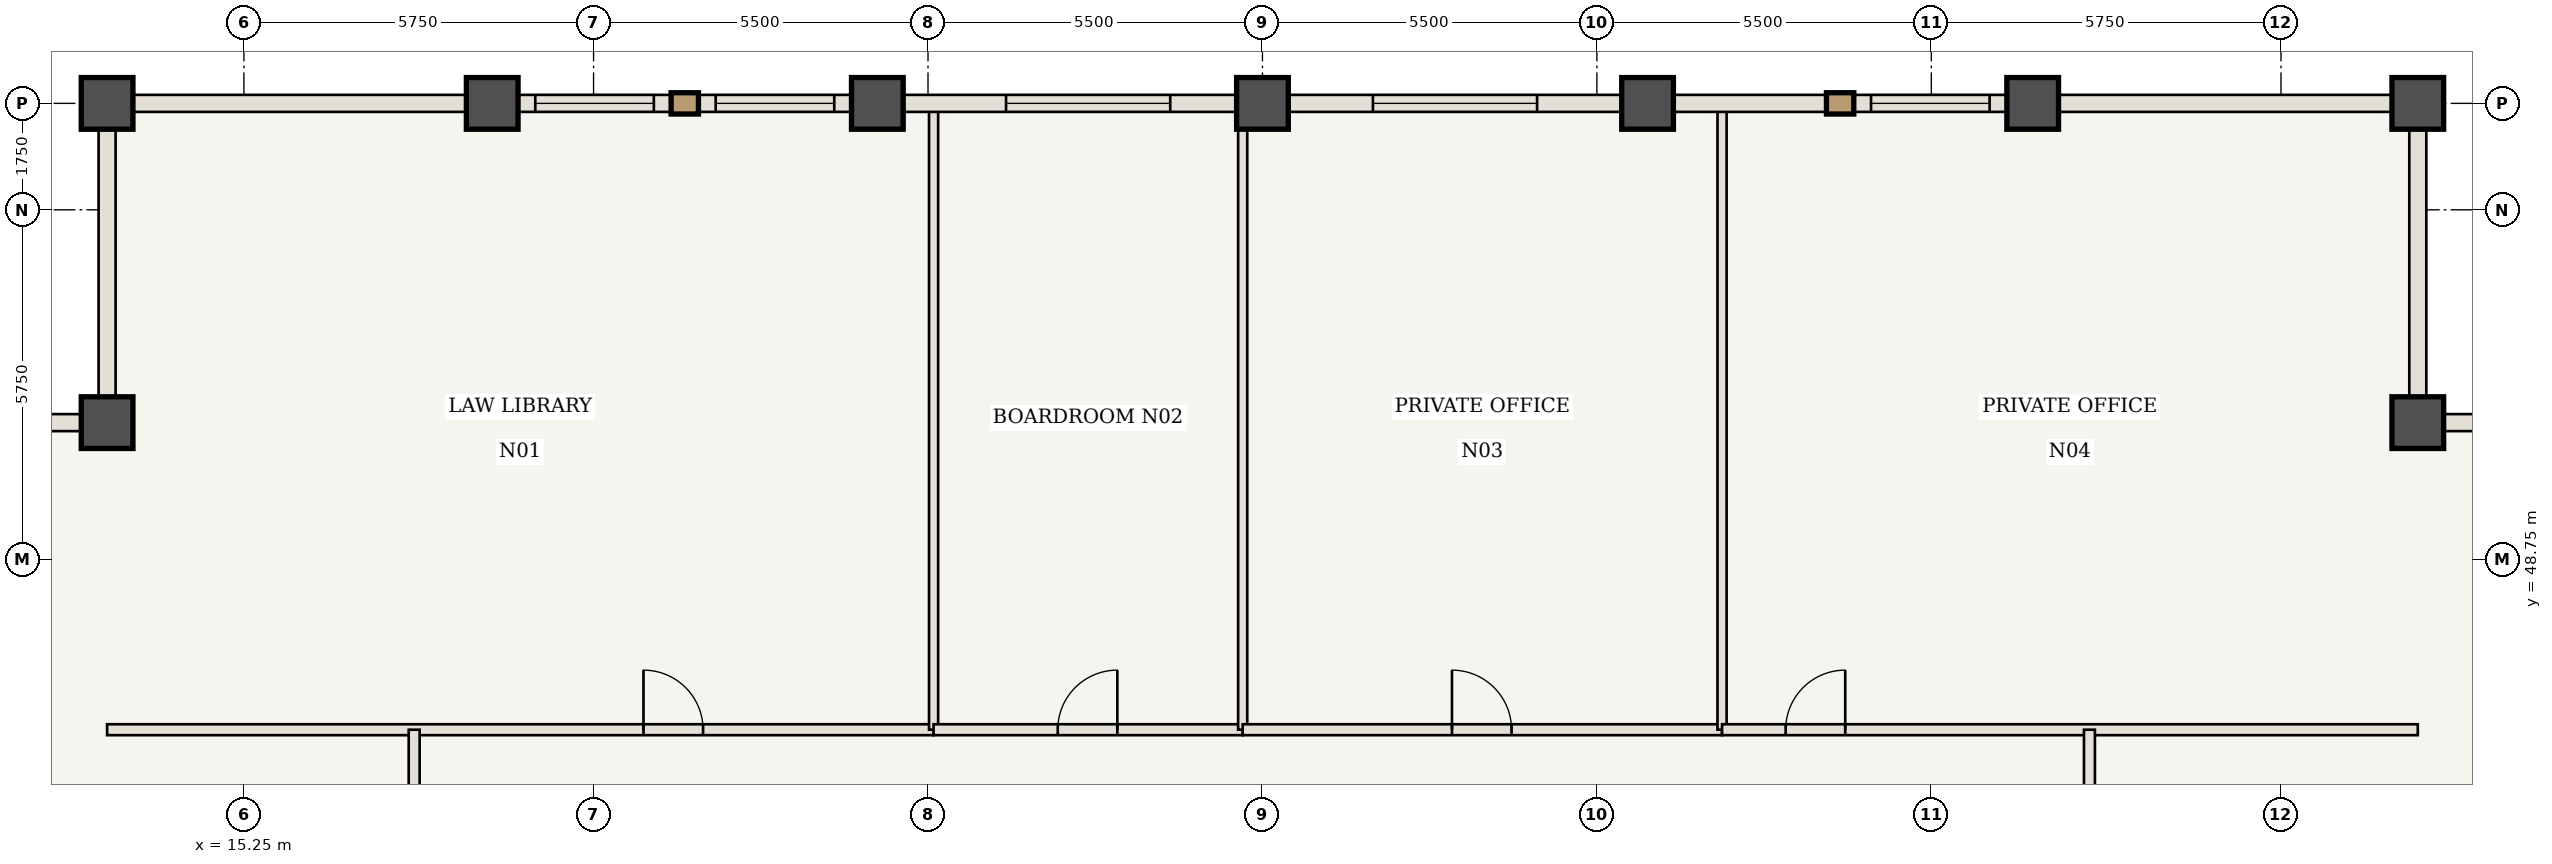
"""IFC4 building model, lengths in metres.
Left out: names, types, materials, properties, quantities, classifications, styles, units other than length and angle.
Written with IfcOpenShell. Run it as: python <this file> out.ifc"""

import sys

from ifc_helpers import new_model, si_unit, direction, frame, frame_2d, origin, origin_2d, place, context, subcontext, project, spatial, rectangle, extrude, element, fill, save


model = new_model("IFC4")
c1 = context("Model", 3, precision=1e-05, world=origin(), true_north=direction((0.0, 1.0)))
c2 = subcontext(c1, "Body", "Model", "MODEL_VIEW")
j1 = project(units=[si_unit("LENGTHUNIT", "METRE"), si_unit("PLANEANGLEUNIT", "RADIAN")], contexts=[c1])
p1 = place(None, origin())
s1 = spatial("IfcSite", under=j1, at=p1, CompositionType="ELEMENT")
p2 = place(p1, origin())
s2 = spatial("IfcBuilding", under=s1, at=p2, CompositionType="ELEMENT")
p3 = place(p2, frame((0.0, 0.0, 198.45)))
s3 = spatial("IfcBuildingStorey", under=s2, at=p3, CompositionType="ELEMENT", Elevation=198.45)
for number, where, z_axis, x_axis in (
    (1, (51.0, 51.0, 0.0), (0.0, 0.0, 1.0), (1.0, 0.0, 0.0)),
    (2, (51.0, 56.25, 0.0), (0.0, 0.0, 1.0), (1.0, 0.0, 0.0)),
    (3, (13.0, 56.25, 0.0), (0.0, 0.0, 1.0), (1.0, 0.0, 0.0)),
    (4, (13.0, 51.0, 0.0), (0.0, 0.0, 1.0), (1.0, 0.0, 0.0)),
    (5, (19.333, 56.25, 0.0), (0.0, 0.0, 1.0), (1.0, 0.0, 0.0)),
    (6, (25.667, 56.25, 0.0), (0.0, 0.0, 1.0), (1.0, 0.0, 0.0)),
    (7, (32.0, 56.25, 0.0), (0.0, 0.0, 1.0), (1.0, 0.0, 0.0)),
    (8, (38.333, 56.25, 0.0), (0.0, 0.0, 1.0), (1.0, 0.0, 0.0)),
    (9, (44.667, 56.25, 0.0), (0.0, 0.0, 1.0), (1.0, 0.0, 0.0)),
):
    element("IfcColumn", number, at=place(p3, frame(where, z_axis=z_axis, x_axis=x_axis)), inside=s3, PredefinedType="COLUMN", context=c2, shape_type="SweptSolid", body=[
        extrude(rectangle(XDim=0.85, YDim=0.85, at=origin_2d()), origin(), (0.0, 0.0, 1.0), 3.85),
    ])
p4 = place(p3, frame((13.0, 45.95, 0.0), z_axis=(0.0, 0.0, 1.0), x_axis=(1.0, 0.0, 0.0)))
e10 = element("IfcWall", 10, at=p4, inside=s3, PredefinedType="STANDARD", context=c2, shape_type="SweptSolid", body=[
    extrude(rectangle(XDim=13.592, YDim=0.18, at=frame_2d((6.796, 0.0))), origin(), (0.0, 0.0, 1.0), 3.685),
])
p5 = place(p4, frame((8.821, 0.0, 0.0)))
e11 = element("IfcOpeningElement", 11, at=p5, cuts=e10, PredefinedType="OPENING", context=c2, shape_type="SweptSolid", body=[
    extrude(rectangle(XDim=0.98, YDim=2.2, at=frame_2d((0.49, 1.1))), frame((0.0, 0.1, 0.0), z_axis=(0.0, -1.0, 0.0), x_axis=(1.0, 0.0, 0.0)), (0.0, 0.0, 1.0), 0.2),
])
p6 = place(p3, frame((26.592, 45.95, 0.0), z_axis=(0.0, 0.0, 1.0), x_axis=(0.0, 1.0, 0.0)))
e12 = element("IfcWall", 12, at=p6, inside=s3, PredefinedType="STANDARD", context=c2, shape_type="SweptSolid", body=[
    extrude(rectangle(XDim=10.24, YDim=0.15, at=frame_2d((5.12, 0.0))), origin(), (0.0, 0.0, 1.0), 3.685),
])
p7 = place(p3, frame((26.592, 45.95, 0.0), z_axis=(0.0, 0.0, 1.0), x_axis=(1.0, 0.0, 0.0)))
e13 = element("IfcWall", 13, at=p7, inside=s3, PredefinedType="STANDARD", context=c2, shape_type="SweptSolid", body=[
    extrude(rectangle(XDim=5.083, YDim=0.18, at=frame_2d((2.542, 0.0))), origin(), (0.0, 0.0, 1.0), 3.685),
])
p8 = place(p7, frame((2.042, 0.0, 0.0)))
e14 = element("IfcOpeningElement", 14, at=p8, cuts=e13, PredefinedType="OPENING", context=c2, shape_type="SweptSolid", body=[
    extrude(rectangle(XDim=0.98, YDim=2.2, at=frame_2d((0.49, 1.1))), frame((0.0, 0.1, 0.0), z_axis=(0.0, -1.0, 0.0), x_axis=(1.0, 0.0, 0.0)), (0.0, 0.0, 1.0), 0.2),
])
p9 = place(p3, frame((31.675, 45.95, 0.0), z_axis=(0.0, 0.0, 1.0), x_axis=(0.0, 1.0, 0.0)))
e15 = element("IfcWall", 15, at=p9, inside=s3, PredefinedType="STANDARD", context=c2, shape_type="SweptSolid", body=[
    extrude(rectangle(XDim=10.24, YDim=0.15, at=frame_2d((5.12, 0.0))), origin(), (0.0, 0.0, 1.0), 3.685),
])
p10 = place(p3, frame((31.675, 45.95, 0.0), z_axis=(0.0, 0.0, 1.0), x_axis=(1.0, 0.0, 0.0)))
e16 = element("IfcWall", 16, at=p10, inside=s3, PredefinedType="STANDARD", context=c2, shape_type="SweptSolid", body=[
    extrude(rectangle(XDim=7.883, YDim=0.18, at=frame_2d((3.942, 0.0))), origin(), (0.0, 0.0, 1.0), 3.685),
])
p11 = place(p10, frame((3.442, 0.0, 0.0)))
e17 = element("IfcOpeningElement", 17, at=p11, cuts=e16, PredefinedType="OPENING", context=c2, shape_type="SweptSolid", body=[
    extrude(rectangle(XDim=0.98, YDim=2.2, at=frame_2d((0.49, 1.1))), frame((0.0, 0.1, 0.0), z_axis=(0.0, -1.0, 0.0), x_axis=(1.0, 0.0, 0.0)), (0.0, 0.0, 1.0), 0.2),
])
p12 = place(p3, frame((39.558, 45.95, 0.0), z_axis=(0.0, 0.0, 1.0), x_axis=(0.0, 1.0, 0.0)))
e18 = element("IfcWall", 18, at=p12, inside=s3, PredefinedType="STANDARD", context=c2, shape_type="SweptSolid", body=[
    extrude(rectangle(XDim=10.24, YDim=0.15, at=frame_2d((5.12, 0.0))), origin(), (0.0, 0.0, 1.0), 3.685),
])
p13 = place(p3, frame((39.558, 45.95, 0.0), z_axis=(0.0, 0.0, 1.0), x_axis=(1.0, 0.0, 0.0)))
e19 = element("IfcWall", 19, at=p13, inside=s3, PredefinedType="STANDARD", context=c2, shape_type="SweptSolid", body=[
    extrude(rectangle(XDim=11.442, YDim=0.18, at=frame_2d((5.721, 0.0))), origin(), (0.0, 0.0, 1.0), 3.685),
])
p14 = place(p13, frame((1.046, 0.0, 0.0)))
e20 = element("IfcOpeningElement", 20, at=p14, cuts=e19, PredefinedType="OPENING", context=c2, shape_type="SweptSolid", body=[
    extrude(rectangle(XDim=0.98, YDim=2.2, at=frame_2d((0.49, 1.1))), frame((0.0, 0.1, 0.0), z_axis=(0.0, -1.0, 0.0), x_axis=(1.0, 0.0, 0.0)), (0.0, 0.0, 1.0), 0.2),
])
p15 = place(p3, frame((18.05, 30.875, 0.0), z_axis=(0.0, 0.0, 1.0), x_axis=(0.0, 1.0, 0.0)))
e21 = element("IfcWall", 21, at=p15, inside=s3, PredefinedType="STANDARD", context=c2, shape_type="SweptSolid", body=[
    extrude(rectangle(XDim=15.075, YDim=0.18, at=frame_2d((7.538, 0.0))), origin(), (0.0, 0.0, 1.0), 3.685),
])
p16 = place(p15, frame((7.038, 0.0, 0.0)))
e22 = element("IfcOpeningElement", 22, at=p16, cuts=e21, PredefinedType="OPENING", context=c2, shape_type="SweptSolid", body=[
    extrude(rectangle(XDim=0.98, YDim=2.2, at=frame_2d((0.49, 1.1))), frame((0.0, 0.1, 0.0), z_axis=(0.0, -1.0, 0.0), x_axis=(1.0, 0.0, 0.0)), (0.0, 0.0, 1.0), 0.2),
])
p17 = place(p3, frame((45.6, 30.75, 0.0), z_axis=(0.0, 0.0, 1.0), x_axis=(0.0, 1.0, 0.0)))
e23 = element("IfcWall", 23, at=p17, inside=s3, PredefinedType="STANDARD", context=c2, shape_type="SweptSolid", body=[
    extrude(rectangle(XDim=15.2, YDim=0.18, at=frame_2d((7.6, 0.0))), origin(), (0.0, 0.0, 1.0), 3.685),
])
p18 = place(p17, frame((7.1, 0.0, 0.0)))
e24 = element("IfcOpeningElement", 24, at=p18, cuts=e23, PredefinedType="OPENING", context=c2, shape_type="SweptSolid", body=[
    extrude(rectangle(XDim=0.98, YDim=2.2, at=frame_2d((0.49, 1.1))), frame((0.0, 0.1, 0.0), z_axis=(0.0, -1.0, 0.0), x_axis=(1.0, 0.0, 0.0)), (0.0, 0.0, 1.0), 0.2),
])
p19 = place(p3, frame((13.0, 56.25, 0.0), z_axis=(0.0, 0.0, 1.0), x_axis=(1.0, 0.0, 0.0)))
e25 = element("IfcWall", 25, at=p19, inside=s3, PredefinedType="USERDEFINED", context=c2, shape_type="SweptSolid", body=[
    extrude(rectangle(XDim=6.333, YDim=0.28, at=frame_2d((3.167, 0.0))), origin(), (0.0, 0.0, 1.0), 2.985),
])
p20 = place(p3, frame((19.333, 56.25, 0.0), z_axis=(0.0, 0.0, 1.0), x_axis=(1.0, 0.0, 0.0)))
e26 = element("IfcWall", 26, at=p20, inside=s3, PredefinedType="USERDEFINED", context=c2, shape_type="SweptSolid", body=[
    extrude(rectangle(XDim=6.333, YDim=0.28, at=frame_2d((3.167, 0.0))), origin(), (0.0, 0.0, 1.0), 2.985),
])
p21 = place(p20, frame((0.708, 0.0, 0.85)))
e27 = element("IfcOpeningElement", 27, at=p21, cuts=e26, PredefinedType="OPENING", context=c2, shape_type="SweptSolid", body=[
    extrude(rectangle(XDim=1.95, YDim=1.935, at=frame_2d((0.975, 0.968))), frame((0.0, 0.15, 0.0), z_axis=(0.0, -1.0, 0.0), x_axis=(1.0, 0.0, 0.0)), (0.0, 0.0, 1.0), 0.3),
])
p22 = place(p20, frame((3.675, 0.0, 0.85)))
e28 = element("IfcOpeningElement", 28, at=p22, cuts=e26, PredefinedType="OPENING", context=c2, shape_type="SweptSolid", body=[
    extrude(rectangle(XDim=1.95, YDim=1.935, at=frame_2d((0.975, 0.968))), frame((0.0, 0.15, 0.0), z_axis=(0.0, -1.0, 0.0), x_axis=(1.0, 0.0, 0.0)), (0.0, 0.0, 1.0), 0.3),
])
p23 = place(p3, frame((25.667, 56.25, 0.0), z_axis=(0.0, 0.0, 1.0), x_axis=(1.0, 0.0, 0.0)))
e29 = element("IfcWall", 29, at=p23, inside=s3, PredefinedType="USERDEFINED", context=c2, shape_type="SweptSolid", body=[
    extrude(rectangle(XDim=6.333, YDim=0.28, at=frame_2d((3.167, 0.0))), origin(), (0.0, 0.0, 1.0), 2.985),
])
p24 = place(p23, frame((2.117, 0.0, 0.85)))
e30 = element("IfcOpeningElement", 30, at=p24, cuts=e29, PredefinedType="OPENING", context=c2, shape_type="SweptSolid", body=[
    extrude(rectangle(XDim=2.7, YDim=1.935, at=frame_2d((1.35, 0.968))), frame((0.0, 0.15, 0.0), z_axis=(0.0, -1.0, 0.0), x_axis=(1.0, 0.0, 0.0)), (0.0, 0.0, 1.0), 0.3),
])
p25 = place(p3, frame((32.0, 56.25, 0.0), z_axis=(0.0, 0.0, 1.0), x_axis=(1.0, 0.0, 0.0)))
e31 = element("IfcWall", 31, at=p25, inside=s3, PredefinedType="USERDEFINED", context=c2, shape_type="SweptSolid", body=[
    extrude(rectangle(XDim=6.333, YDim=0.28, at=frame_2d((3.167, 0.0))), origin(), (0.0, 0.0, 1.0), 2.985),
])
p26 = place(p25, frame((1.817, 0.0, 0.85)))
e32 = element("IfcOpeningElement", 32, at=p26, cuts=e31, PredefinedType="OPENING", context=c2, shape_type="SweptSolid", body=[
    extrude(rectangle(XDim=2.7, YDim=1.935, at=frame_2d((1.35, 0.968))), frame((0.0, 0.15, 0.0), z_axis=(0.0, -1.0, 0.0), x_axis=(1.0, 0.0, 0.0)), (0.0, 0.0, 1.0), 0.3),
])
p27 = place(p3, frame((38.333, 56.25, 0.0), z_axis=(0.0, 0.0, 1.0), x_axis=(1.0, 0.0, 0.0)))
e33 = element("IfcWall", 33, at=p27, inside=s3, PredefinedType="USERDEFINED", context=c2, shape_type="SweptSolid", body=[
    extrude(rectangle(XDim=6.333, YDim=0.28, at=frame_2d((3.167, 0.0))), origin(), (0.0, 0.0, 1.0), 2.985),
])
p28 = place(p27, frame((3.675, 0.0, 0.85)))
e34 = element("IfcOpeningElement", 34, at=p28, cuts=e33, PredefinedType="OPENING", context=c2, shape_type="SweptSolid", body=[
    extrude(rectangle(XDim=1.95, YDim=1.935, at=frame_2d((0.975, 0.968))), frame((0.0, 0.15, 0.0), z_axis=(0.0, -1.0, 0.0), x_axis=(1.0, 0.0, 0.0)), (0.0, 0.0, 1.0), 0.3),
])
p29 = place(p3, frame((44.667, 56.25, 0.0), z_axis=(0.0, 0.0, 1.0), x_axis=(1.0, 0.0, 0.0)))
e35 = element("IfcWall", 35, at=p29, inside=s3, PredefinedType="USERDEFINED", context=c2, shape_type="SweptSolid", body=[
    extrude(rectangle(XDim=6.333, YDim=0.28, at=frame_2d((3.167, 0.0))), origin(), (0.0, 0.0, 1.0), 2.985),
])
for number, where, z_axis, x_axis in (
    (36, (51.0, 51.0, 0.0), (0.0, 0.0, 1.0), (1.0, 0.0, 0.0)),
    (37, (51.0, 56.25, 0.0), (0.0, 0.0, 1.0), (0.0, -1.0, 0.0)),
    (38, (13.0, 51.0, 0.0), (0.0, 0.0, 1.0), (0.0, 1.0, 0.0)),
    (39, (7.75, 51.0, 0.0), (0.0, 0.0, 1.0), (1.0, 0.0, 0.0)),
):
    element("IfcWall", number, at=place(p3, frame(where, z_axis=z_axis, x_axis=x_axis)), inside=s3, PredefinedType="USERDEFINED", context=c2, shape_type="SweptSolid", body=[
        extrude(rectangle(XDim=5.25, YDim=0.28, at=frame_2d((2.625, 0.0))), origin(), (0.0, 0.0, 1.0), 2.985),
    ])
p30 = place(p5, origin())
e40 = element("IfcDoor", 40, at=p30, inside=s3, OperationType="SINGLE_SWING_LEFT", PredefinedType="DOOR", context=c2, shape_type="SweptSolid", body=[
    extrude(rectangle(XDim=0.98, YDim=2.2, at=frame_2d((0.49, 1.1))), frame((0.0, 0.025, 0.0), z_axis=(0.0, -1.0, 0.0), x_axis=(1.0, 0.0, 0.0)), (0.0, 0.0, 1.0), 0.05),
])
fill(e11, e40)
p31 = place(p8, origin())
e41 = element("IfcDoor", 41, at=p31, inside=s3, OperationType="SINGLE_SWING_RIGHT", PredefinedType="DOOR", context=c2, shape_type="SweptSolid", body=[
    extrude(rectangle(XDim=0.98, YDim=2.2, at=frame_2d((0.49, 1.1))), frame((0.0, 0.025, 0.0), z_axis=(0.0, -1.0, 0.0), x_axis=(1.0, 0.0, 0.0)), (0.0, 0.0, 1.0), 0.05),
])
fill(e14, e41)
p32 = place(p11, origin())
e42 = element("IfcDoor", 42, at=p32, inside=s3, OperationType="SINGLE_SWING_LEFT", PredefinedType="DOOR", context=c2, shape_type="SweptSolid", body=[
    extrude(rectangle(XDim=0.98, YDim=2.2, at=frame_2d((0.49, 1.1))), frame((0.0, 0.025, 0.0), z_axis=(0.0, -1.0, 0.0), x_axis=(1.0, 0.0, 0.0)), (0.0, 0.0, 1.0), 0.05),
])
fill(e17, e42)
p33 = place(p14, origin())
e43 = element("IfcDoor", 43, at=p33, inside=s3, OperationType="SINGLE_SWING_RIGHT", PredefinedType="DOOR", context=c2, shape_type="SweptSolid", body=[
    extrude(rectangle(XDim=0.98, YDim=2.2, at=frame_2d((0.49, 1.1))), frame((0.0, 0.025, 0.0), z_axis=(0.0, -1.0, 0.0), x_axis=(1.0, 0.0, 0.0)), (0.0, 0.0, 1.0), 0.05),
])
fill(e20, e43)
p34 = place(p21, origin())
e44 = element("IfcWindow", 44, at=p34, inside=s3, PartitioningType="SINGLE_PANEL", PredefinedType="WINDOW", context=c2, shape_type="SweptSolid", body=[
    extrude(rectangle(XDim=1.95, YDim=1.935, at=frame_2d((0.975, 0.968))), frame((0.0, 0.03, 0.0), z_axis=(0.0, -1.0, 0.0), x_axis=(1.0, 0.0, 0.0)), (0.0, 0.0, 1.0), 0.06),
])
fill(e27, e44)
p35 = place(p22, origin())
e45 = element("IfcWindow", 45, at=p35, inside=s3, PartitioningType="SINGLE_PANEL", PredefinedType="WINDOW", context=c2, shape_type="SweptSolid", body=[
    extrude(rectangle(XDim=1.95, YDim=1.935, at=frame_2d((0.975, 0.968))), frame((0.0, 0.03, 0.0), z_axis=(0.0, -1.0, 0.0), x_axis=(1.0, 0.0, 0.0)), (0.0, 0.0, 1.0), 0.06),
])
fill(e28, e45)
p36 = place(p24, origin())
e46 = element("IfcWindow", 46, at=p36, inside=s3, PartitioningType="SINGLE_PANEL", PredefinedType="WINDOW", context=c2, shape_type="SweptSolid", body=[
    extrude(rectangle(XDim=2.7, YDim=1.935, at=frame_2d((1.35, 0.968))), frame((0.0, 0.03, 0.0), z_axis=(0.0, -1.0, 0.0), x_axis=(1.0, 0.0, 0.0)), (0.0, 0.0, 1.0), 0.06),
])
fill(e30, e46)
p37 = place(p26, origin())
e47 = element("IfcWindow", 47, at=p37, inside=s3, PartitioningType="SINGLE_PANEL", PredefinedType="WINDOW", context=c2, shape_type="SweptSolid", body=[
    extrude(rectangle(XDim=2.7, YDim=1.935, at=frame_2d((1.35, 0.968))), frame((0.0, 0.03, 0.0), z_axis=(0.0, -1.0, 0.0), x_axis=(1.0, 0.0, 0.0)), (0.0, 0.0, 1.0), 0.06),
])
fill(e32, e47)
p38 = place(p28, origin())
e48 = element("IfcWindow", 48, at=p38, inside=s3, PartitioningType="SINGLE_PANEL", PredefinedType="WINDOW", context=c2, shape_type="SweptSolid", body=[
    extrude(rectangle(XDim=1.95, YDim=1.935, at=frame_2d((0.975, 0.968))), frame((0.0, 0.03, 0.0), z_axis=(0.0, -1.0, 0.0), x_axis=(1.0, 0.0, 0.0)), (0.0, 0.0, 1.0), 0.06),
])
fill(e34, e48)
save(model, sys.argv[1])
